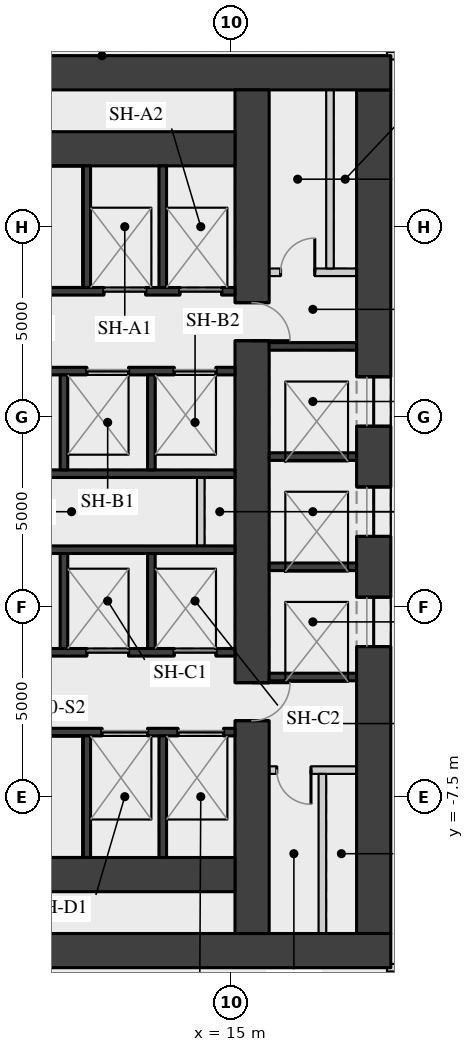
"""IFC4 building model, lengths in metres.
Left out: names, types, materials, properties, quantities, classifications, styles, units other than length and angle.
Written with IfcOpenShell. Run it as: python <this file> out.ifc"""

import sys

from ifc_helpers import new_model, si_unit, direction, frame, frame_2d, origin, place, context, subcontext, project, spatial, rectangle, extrude, element, fill, save


model = new_model("IFC4")
c1 = context("Model", 3, precision=1e-05, world=origin(), true_north=direction((0.0, 1.0)))
c2 = subcontext(c1, "Body", "Model", "MODEL_VIEW")
j1 = project(units=[si_unit("LENGTHUNIT", "METRE"), si_unit("PLANEANGLEUNIT", "RADIAN")], contexts=[c1])
p1 = place(None, origin())
s1 = spatial("IfcSite", under=j1, at=p1, CompositionType="ELEMENT")
p2 = place(p1, origin())
s2 = spatial("IfcBuilding", under=s1, at=p2, CompositionType="ELEMENT")
p3 = place(p2, origin())
s3 = spatial("IfcBuildingStorey", under=s2, at=p3, CompositionType="ELEMENT", Elevation=0.0)
p4 = place(p3, frame((18.75, -11.1, 0.0), z_axis=(0.0, 0.0, 1.0), x_axis=(0.0, 1.0, 0.0)))
e1 = element("IfcWall", 1, at=p4, inside=s3, PredefinedType="SHEAR", context=c2, shape_type="SweptSolid", body=[
    extrude(rectangle(XDim=22.2, YDim=0.9, at=frame_2d((11.1, 0.0))), origin(), (0.0, 0.0, 1.0), 7.09),
])
p5 = place(p4, frame((7.55, 0.0, 0.0)))
e2 = element("IfcOpeningElement", 2, at=p5, cuts=e1, PredefinedType="OPENING", context=c2, shape_type="SweptSolid", body=[
    extrude(rectangle(XDim=1.3, YDim=2.1, at=frame_2d((0.65, 1.05))), frame((0.0, 0.46, 0.0), z_axis=(0.0, -1.0, 0.0), x_axis=(1.0, 0.0, 0.0)), (0.0, 0.0, 1.0), 0.92),
])
p6 = place(p4, frame((10.45, 0.0, 0.0)))
e3 = element("IfcOpeningElement", 3, at=p6, cuts=e1, PredefinedType="OPENING", context=c2, shape_type="SweptSolid", body=[
    extrude(rectangle(XDim=1.3, YDim=2.1, at=frame_2d((0.65, 1.05))), frame((0.0, 0.46, 0.0), z_axis=(0.0, -1.0, 0.0), x_axis=(1.0, 0.0, 0.0)), (0.0, 0.0, 1.0), 0.92),
])
p7 = place(p4, frame((13.35, 0.0, 0.0)))
e4 = element("IfcOpeningElement", 4, at=p7, cuts=e1, PredefinedType="OPENING", context=c2, shape_type="SweptSolid", body=[
    extrude(rectangle(XDim=1.3, YDim=2.1, at=frame_2d((0.65, 1.05))), frame((0.0, 0.46, 0.0), z_axis=(0.0, -1.0, 0.0), x_axis=(1.0, 0.0, 0.0)), (0.0, 0.0, 1.0), 0.92),
])
for number, where, z_axis, x_axis in (
    (5, (4.0, 11.55, 0.0), (0.0, 0.0, 1.0), (1.0, 0.0, 0.0)),
    (6, (4.0, -11.55, 0.0), (0.0, 0.0, 1.0), (1.0, 0.0, 0.0)),
):
    element("IfcWall", number, at=place(p3, frame(where, z_axis=z_axis, x_axis=x_axis)), inside=s3, PredefinedType="SHEAR", context=c2, shape_type="SweptSolid", body=[
        extrude(rectangle(XDim=15.2, YDim=0.9, at=frame_2d((7.6, 0.0))), origin(), (0.0, 0.0, 1.0), 7.09),
    ])
p8 = place(p3, frame((15.55, -11.1, 0.0), z_axis=(0.0, 0.0, 1.0), x_axis=(0.0, 1.0, 0.0)))
e7 = element("IfcWall", 7, at=p8, inside=s3, PredefinedType="SHEAR", context=c2, shape_type="SweptSolid", body=[
    extrude(rectangle(XDim=22.2, YDim=0.9, at=frame_2d((11.1, 0.0))), origin(), (0.0, 0.0, 1.0), 7.09),
])
p9 = place(p8, frame((15.6, 0.0, 0.0)))
e8 = element("IfcOpeningElement", 8, at=p9, cuts=e7, PredefinedType="OPENING", context=c2, shape_type="SweptSolid", body=[
    extrude(rectangle(XDim=1.0, YDim=2.1, at=frame_2d((0.5, 1.05))), frame((0.0, 0.46, 0.0), z_axis=(0.0, -1.0, 0.0), x_axis=(1.0, 0.0, 0.0)), (0.0, 0.0, 1.0), 0.92),
])
p10 = place(p8, frame((5.6, 0.0, 0.0)))
e9 = element("IfcOpeningElement", 9, at=p10, cuts=e7, PredefinedType="OPENING", context=c2, shape_type="SweptSolid", body=[
    extrude(rectangle(XDim=1.0, YDim=2.1, at=frame_2d((0.5, 1.05))), frame((0.0, 0.46, 0.0), z_axis=(0.0, -1.0, 0.0), x_axis=(1.0, 0.0, 0.0)), (0.0, 0.0, 1.0), 0.92),
])
for number, where, z_axis, x_axis in (
    (10, (4.9, 9.55, 0.0), (0.0, 0.0, 1.0), (1.0, 0.0, 0.0)),
    (11, (4.9, -9.55, 0.0), (0.0, 0.0, 1.0), (1.0, 0.0, 0.0)),
):
    element("IfcWall", number, at=place(p3, frame(where, z_axis=z_axis, x_axis=x_axis)), inside=s3, PredefinedType="SHEAR", context=c2, shape_type="SweptSolid", body=[
        extrude(rectangle(XDim=10.2, YDim=0.9, at=frame_2d((5.1, 0.0))), origin(), (0.0, 0.0, 1.0), 7.09),
    ])
p11 = place(p3, frame((4.9, 5.8, 0.0), z_axis=(0.0, 0.0, 1.0), x_axis=(1.0, 0.0, 0.0)))
e12 = element("IfcWall", 12, at=p11, inside=s3, PredefinedType="SHEAR", context=c2, shape_type="SweptSolid", body=[
    extrude(rectangle(XDim=10.2, YDim=0.2, at=frame_2d((5.1, 0.0))), origin(), (0.0, 0.0, 1.0), 7.09),
])
p12 = place(p11, frame((6.75, 0.0, 0.0)))
e13 = element("IfcOpeningElement", 13, at=p12, cuts=e12, PredefinedType="OPENING", context=c2, shape_type="SweptSolid", body=[
    extrude(rectangle(XDim=1.1, YDim=2.1, at=frame_2d((0.55, 1.05))), frame((0.0, 0.11, 0.0), z_axis=(0.0, -1.0, 0.0), x_axis=(1.0, 0.0, 0.0)), (0.0, 0.0, 1.0), 0.22),
])
p13 = place(p11, frame((8.75, 0.0, 0.0)))
e14 = element("IfcOpeningElement", 14, at=p13, cuts=e12, PredefinedType="OPENING", context=c2, shape_type="SweptSolid", body=[
    extrude(rectangle(XDim=1.1, YDim=2.1, at=frame_2d((0.55, 1.05))), frame((0.0, 0.11, 0.0), z_axis=(0.0, -1.0, 0.0), x_axis=(1.0, 0.0, 0.0)), (0.0, 0.0, 1.0), 0.22),
])
p14 = place(p3, frame((4.9, 3.7, 0.0), z_axis=(0.0, 0.0, 1.0), x_axis=(1.0, 0.0, 0.0)))
e15 = element("IfcWall", 15, at=p14, inside=s3, PredefinedType="SHEAR", context=c2, shape_type="SweptSolid", body=[
    extrude(rectangle(XDim=10.2, YDim=0.2, at=frame_2d((5.1, 0.0))), origin(), (0.0, 0.0, 1.0), 7.09),
])
p15 = place(p14, frame((6.3, 0.0, 0.0)))
e16 = element("IfcOpeningElement", 16, at=p15, cuts=e15, PredefinedType="OPENING", context=c2, shape_type="SweptSolid", body=[
    extrude(rectangle(XDim=1.1, YDim=2.1, at=frame_2d((0.55, 1.05))), frame((0.0, 0.11, 0.0), z_axis=(0.0, -1.0, 0.0), x_axis=(1.0, 0.0, 0.0)), (0.0, 0.0, 1.0), 0.22),
])
p16 = place(p14, frame((8.6, 0.0, 0.0)))
e17 = element("IfcOpeningElement", 17, at=p16, cuts=e15, PredefinedType="OPENING", context=c2, shape_type="SweptSolid", body=[
    extrude(rectangle(XDim=1.1, YDim=2.1, at=frame_2d((0.55, 1.05))), frame((0.0, 0.11, 0.0), z_axis=(0.0, -1.0, 0.0), x_axis=(1.0, 0.0, 0.0)), (0.0, 0.0, 1.0), 0.22),
])
for number, where, z_axis, x_axis in (
    (18, (4.9, 1.0, 0.0), (0.0, 0.0, 1.0), (1.0, 0.0, 0.0)),
    (19, (4.9, -1.0, 0.0), (0.0, 0.0, 1.0), (1.0, 0.0, 0.0)),
):
    element("IfcWall", number, at=place(p3, frame(where, z_axis=z_axis, x_axis=x_axis)), inside=s3, PredefinedType="SHEAR", context=c2, shape_type="SweptSolid", body=[
        extrude(rectangle(XDim=10.2, YDim=0.2, at=frame_2d((5.1, 0.0))), origin(), (0.0, 0.0, 1.0), 7.09),
    ])
p17 = place(p3, frame((4.9, -3.7, 0.0), z_axis=(0.0, 0.0, 1.0), x_axis=(1.0, 0.0, 0.0)))
e20 = element("IfcWall", 20, at=p17, inside=s3, PredefinedType="SHEAR", context=c2, shape_type="SweptSolid", body=[
    extrude(rectangle(XDim=10.2, YDim=0.2, at=frame_2d((5.1, 0.0))), origin(), (0.0, 0.0, 1.0), 7.09),
])
p18 = place(p17, frame((6.3, 0.0, 0.0)))
e21 = element("IfcOpeningElement", 21, at=p18, cuts=e20, PredefinedType="OPENING", context=c2, shape_type="SweptSolid", body=[
    extrude(rectangle(XDim=1.1, YDim=2.1, at=frame_2d((0.55, 1.05))), frame((0.0, 0.11, 0.0), z_axis=(0.0, -1.0, 0.0), x_axis=(1.0, 0.0, 0.0)), (0.0, 0.0, 1.0), 0.22),
])
p19 = place(p17, frame((8.6, 0.0, 0.0)))
e22 = element("IfcOpeningElement", 22, at=p19, cuts=e20, PredefinedType="OPENING", context=c2, shape_type="SweptSolid", body=[
    extrude(rectangle(XDim=1.1, YDim=2.1, at=frame_2d((0.55, 1.05))), frame((0.0, 0.11, 0.0), z_axis=(0.0, -1.0, 0.0), x_axis=(1.0, 0.0, 0.0)), (0.0, 0.0, 1.0), 0.22),
])
p20 = place(p3, frame((4.9, -5.8, 0.0), z_axis=(0.0, 0.0, 1.0), x_axis=(1.0, 0.0, 0.0)))
e23 = element("IfcWall", 23, at=p20, inside=s3, PredefinedType="SHEAR", context=c2, shape_type="SweptSolid", body=[
    extrude(rectangle(XDim=10.2, YDim=0.2, at=frame_2d((5.1, 0.0))), origin(), (0.0, 0.0, 1.0), 7.09),
])
p21 = place(p20, frame((6.7, 0.0, 0.0)))
e24 = element("IfcOpeningElement", 24, at=p21, cuts=e23, PredefinedType="OPENING", context=c2, shape_type="SweptSolid", body=[
    extrude(rectangle(XDim=1.2, YDim=2.1, at=frame_2d((0.6, 1.05))), frame((0.0, 0.11, 0.0), z_axis=(0.0, -1.0, 0.0), x_axis=(1.0, 0.0, 0.0)), (0.0, 0.0, 1.0), 0.22),
])
p22 = place(p20, frame((8.7, 0.0, 0.0)))
e25 = element("IfcOpeningElement", 25, at=p22, cuts=e23, PredefinedType="OPENING", context=c2, shape_type="SweptSolid", body=[
    extrude(rectangle(XDim=1.2, YDim=2.1, at=frame_2d((0.6, 1.05))), frame((0.0, 0.11, 0.0), z_axis=(0.0, -1.0, 0.0), x_axis=(1.0, 0.0, 0.0)), (0.0, 0.0, 1.0), 0.22),
])
for number, where, z_axis, x_axis in (
    (26, (11.2, 5.9, 0.0), (0.0, 0.0, 1.0), (0.0, 1.0, 0.0)),
    (27, (11.2, -9.1, 0.0), (0.0, 0.0, 1.0), (0.0, 1.0, 0.0)),
    (28, (13.2, 5.9, 0.0), (0.0, 0.0, 1.0), (0.0, 1.0, 0.0)),
    (29, (13.2, -9.1, 0.0), (0.0, 0.0, 1.0), (0.0, 1.0, 0.0)),
):
    element("IfcWall", number, at=place(p3, frame(where, z_axis=z_axis, x_axis=x_axis)), inside=s3, PredefinedType="SHEAR", context=c2, shape_type="SweptSolid", body=[
        extrude(rectangle(XDim=3.2, YDim=0.2, at=frame_2d((1.6, 0.0))), origin(), (0.0, 0.0, 1.0), 7.09),
    ])
for number, where, z_axis, x_axis in (
    (30, (10.6, 1.1, 0.0), (0.0, 0.0, 1.0), (0.0, 1.0, 0.0)),
    (31, (10.6, -3.6, 0.0), (0.0, 0.0, 1.0), (0.0, 1.0, 0.0)),
    (32, (12.9, 1.1, 0.0), (0.0, 0.0, 1.0), (0.0, 1.0, 0.0)),
    (33, (12.9, -3.6, 0.0), (0.0, 0.0, 1.0), (0.0, 1.0, 0.0)),
):
    element("IfcWall", number, at=place(p3, frame(where, z_axis=z_axis, x_axis=x_axis)), inside=s3, PredefinedType="SHEAR", context=c2, shape_type="SweptSolid", body=[
        extrude(rectangle(XDim=2.5, YDim=0.2, at=frame_2d((1.25, 0.0))), origin(), (0.0, 0.0, 1.0), 7.09),
    ])
p23 = place(p3, frame((14.2, -0.9, 0.0), z_axis=(0.0, 0.0, 1.0), x_axis=(0.0, 1.0, 0.0)))
e34 = element("IfcWall", 34, at=p23, inside=s3, PredefinedType="PARTITIONING", context=c2, shape_type="SweptSolid", body=[
    extrude(rectangle(XDim=1.8, YDim=0.2, at=frame_2d((0.9, 0.0))), origin(), (0.0, 0.0, 1.0), 7.09),
])
for number, where, z_axis, x_axis in (
    (35, (16.0, -4.35, 0.0), (0.0, 0.0, 1.0), (1.0, 0.0, 0.0)),
    (36, (16.0, -1.45, 0.0), (0.0, 0.0, 1.0), (1.0, 0.0, 0.0)),
    (37, (16.0, 1.45, 0.0), (0.0, 0.0, 1.0), (1.0, 0.0, 0.0)),
    (38, (16.0, 4.35, 0.0), (0.0, 0.0, 1.0), (1.0, 0.0, 0.0)),
):
    element("IfcWall", number, at=place(p3, frame(where, z_axis=z_axis, x_axis=x_axis)), inside=s3, PredefinedType="SHEAR", context=c2, shape_type="SweptSolid", body=[
        extrude(rectangle(XDim=2.3, YDim=0.2, at=frame_2d((1.15, 0.0))), origin(), (0.0, 0.0, 1.0), 7.09),
    ])
p24 = place(p3, frame((16.0, 6.3, 0.0), z_axis=(0.0, 0.0, 1.0), x_axis=(1.0, 0.0, 0.0)))
e39 = element("IfcWall", 39, at=p24, inside=s3, PredefinedType="PARTITIONING", context=c2, shape_type="SweptSolid", body=[
    extrude(rectangle(XDim=2.3, YDim=0.2, at=frame_2d((1.15, 0.0))), origin(), (0.0, 0.0, 1.0), 7.09),
])
p25 = place(p24, frame((0.3, 0.0, 0.0)))
e40 = element("IfcOpeningElement", 40, at=p25, cuts=e39, PredefinedType="OPENING", context=c2, shape_type="SweptSolid", body=[
    extrude(rectangle(XDim=0.9, YDim=2.1, at=frame_2d((0.45, 1.05))), frame((0.0, 0.11, 0.0), z_axis=(0.0, -1.0, 0.0), x_axis=(1.0, 0.0, 0.0)), (0.0, 0.0, 1.0), 0.22),
])
p26 = place(p3, frame((17.6, 6.4, 0.0), z_axis=(0.0, 0.0, 1.0), x_axis=(0.0, 1.0, 0.0)))
e41 = element("IfcWall", 41, at=p26, inside=s3, PredefinedType="PARTITIONING", context=c2, shape_type="SweptSolid", body=[
    extrude(rectangle(XDim=4.7, YDim=0.2, at=frame_2d((2.35, 0.0))), origin(), (0.0, 0.0, 1.0), 7.09),
])
p27 = place(p3, frame((16.0, -6.8, 0.0), z_axis=(0.0, 0.0, 1.0), x_axis=(1.0, 0.0, 0.0)))
e42 = element("IfcWall", 42, at=p27, inside=s3, PredefinedType="PARTITIONING", context=c2, shape_type="SweptSolid", body=[
    extrude(rectangle(XDim=2.3, YDim=0.2, at=frame_2d((1.15, 0.0))), origin(), (0.0, 0.0, 1.0), 7.09),
])
p28 = place(p27, frame((0.2, 0.0, 0.0)))
e43 = element("IfcOpeningElement", 43, at=p28, cuts=e42, PredefinedType="OPENING", context=c2, shape_type="SweptSolid", body=[
    extrude(rectangle(XDim=0.9, YDim=2.1, at=frame_2d((0.45, 1.05))), frame((0.0, 0.11, 0.0), z_axis=(0.0, -1.0, 0.0), x_axis=(1.0, 0.0, 0.0)), (0.0, 0.0, 1.0), 0.22),
])
p29 = place(p3, frame((17.4, -11.1, 0.0), z_axis=(0.0, 0.0, 1.0), x_axis=(0.0, 1.0, 0.0)))
e44 = element("IfcWall", 44, at=p29, inside=s3, PredefinedType="PARTITIONING", context=c2, shape_type="SweptSolid", body=[
    extrude(rectangle(XDim=4.2, YDim=0.2, at=frame_2d((2.1, 0.0))), origin(), (0.0, 0.0, 1.0), 7.09),
])
p30 = place(p3, frame((19.1, -12.0, 0.0), z_axis=(0.0, 0.0, 1.0), x_axis=(1.0, 0.0, 0.0)))
e45 = element("IfcWall", 45, at=p30, inside=s3, PredefinedType="PARTITIONING", context=c2, shape_type="SweptSolid", body=[
    extrude(rectangle(XDim=8.8, YDim=0.2, at=frame_2d((4.4, 0.0))), origin(), (0.0, 0.0, 1.0), 7.09),
])
p31 = place(p30, frame((4.4, 0.0, 0.0)))
e46 = element("IfcOpeningElement", 46, at=p31, cuts=e45, PredefinedType="OPENING", context=c2, shape_type="SweptSolid", body=[
    extrude(rectangle(XDim=1.0, YDim=2.1, at=frame_2d((0.5, 1.05))), frame((0.0, 0.11, 0.0), z_axis=(0.0, -1.0, 0.0), x_axis=(1.0, 0.0, 0.0)), (0.0, 0.0, 1.0), 0.22),
])
p32 = place(p3, frame((19.1, 12.0, 0.0), z_axis=(0.0, 0.0, 1.0), x_axis=(1.0, 0.0, 0.0)))
e47 = element("IfcWall", 47, at=p32, inside=s3, PredefinedType="PARTITIONING", context=c2, shape_type="SweptSolid", body=[
    extrude(rectangle(XDim=21.767, YDim=0.2, at=frame_2d((10.883, 0.0))), origin(), (0.0, 0.0, 1.0), 6.09),
])
p33 = place(p32, frame((4.4, 0.0, 0.0)))
e48 = element("IfcOpeningElement", 48, at=p33, cuts=e47, PredefinedType="OPENING", context=c2, shape_type="SweptSolid", body=[
    extrude(rectangle(XDim=1.0, YDim=2.1, at=frame_2d((0.5, 1.05))), frame((0.0, 0.11, 0.0), z_axis=(0.0, -1.0, 0.0), x_axis=(1.0, 0.0, 0.0)), (0.0, 0.0, 1.0), 0.22),
])
p34 = place(p12, origin())
e49 = element("IfcDoor", 49, at=p34, inside=s3, OperationType="DOUBLE_DOOR_SLIDING", PredefinedType="DOOR", context=c2, shape_type="SweptSolid", body=[
    extrude(rectangle(XDim=1.1, YDim=2.1, at=frame_2d((0.55, 1.05))), frame((0.0, 0.025, 0.0), z_axis=(0.0, -1.0, 0.0), x_axis=(1.0, 0.0, 0.0)), (0.0, 0.0, 1.0), 0.05),
])
fill(e13, e49)
p35 = place(p13, origin())
e50 = element("IfcDoor", 50, at=p35, inside=s3, OperationType="DOUBLE_DOOR_SLIDING", PredefinedType="DOOR", context=c2, shape_type="SweptSolid", body=[
    extrude(rectangle(XDim=1.1, YDim=2.1, at=frame_2d((0.55, 1.05))), frame((0.0, 0.025, 0.0), z_axis=(0.0, -1.0, 0.0), x_axis=(1.0, 0.0, 0.0)), (0.0, 0.0, 1.0), 0.05),
])
fill(e14, e50)
p36 = place(p15, origin())
e51 = element("IfcDoor", 51, at=p36, inside=s3, OperationType="DOUBLE_DOOR_SLIDING", PredefinedType="DOOR", context=c2, shape_type="SweptSolid", body=[
    extrude(rectangle(XDim=1.1, YDim=2.1, at=frame_2d((0.55, 1.05))), frame((0.0, 0.025, 0.0), z_axis=(0.0, -1.0, 0.0), x_axis=(1.0, 0.0, 0.0)), (0.0, 0.0, 1.0), 0.05),
])
fill(e16, e51)
p37 = place(p16, origin())
e52 = element("IfcDoor", 52, at=p37, inside=s3, OperationType="DOUBLE_DOOR_SLIDING", PredefinedType="DOOR", context=c2, shape_type="SweptSolid", body=[
    extrude(rectangle(XDim=1.1, YDim=2.1, at=frame_2d((0.55, 1.05))), frame((0.0, 0.025, 0.0), z_axis=(0.0, -1.0, 0.0), x_axis=(1.0, 0.0, 0.0)), (0.0, 0.0, 1.0), 0.05),
])
fill(e17, e52)
p38 = place(p18, origin())
e53 = element("IfcDoor", 53, at=p38, inside=s3, OperationType="DOUBLE_DOOR_SLIDING", PredefinedType="DOOR", context=c2, shape_type="SweptSolid", body=[
    extrude(rectangle(XDim=1.1, YDim=2.1, at=frame_2d((0.55, 1.05))), frame((0.0, 0.025, 0.0), z_axis=(0.0, -1.0, 0.0), x_axis=(1.0, 0.0, 0.0)), (0.0, 0.0, 1.0), 0.05),
])
fill(e21, e53)
p39 = place(p19, origin())
e54 = element("IfcDoor", 54, at=p39, inside=s3, OperationType="DOUBLE_DOOR_SLIDING", PredefinedType="DOOR", context=c2, shape_type="SweptSolid", body=[
    extrude(rectangle(XDim=1.1, YDim=2.1, at=frame_2d((0.55, 1.05))), frame((0.0, 0.025, 0.0), z_axis=(0.0, -1.0, 0.0), x_axis=(1.0, 0.0, 0.0)), (0.0, 0.0, 1.0), 0.05),
])
fill(e22, e54)
p40 = place(p21, origin())
e55 = element("IfcDoor", 55, at=p40, inside=s3, OperationType="DOUBLE_DOOR_SLIDING", PredefinedType="DOOR", context=c2, shape_type="SweptSolid", body=[
    extrude(rectangle(XDim=1.2, YDim=2.1, at=frame_2d((0.6, 1.05))), frame((0.0, 0.025, 0.0), z_axis=(0.0, -1.0, 0.0), x_axis=(1.0, 0.0, 0.0)), (0.0, 0.0, 1.0), 0.05),
])
fill(e24, e55)
p41 = place(p22, origin())
e56 = element("IfcDoor", 56, at=p41, inside=s3, OperationType="DOUBLE_DOOR_SLIDING", PredefinedType="DOOR", context=c2, shape_type="SweptSolid", body=[
    extrude(rectangle(XDim=1.2, YDim=2.1, at=frame_2d((0.6, 1.05))), frame((0.0, 0.025, 0.0), z_axis=(0.0, -1.0, 0.0), x_axis=(1.0, 0.0, 0.0)), (0.0, 0.0, 1.0), 0.05),
])
fill(e25, e56)
p42 = place(p5, origin())
e57 = element("IfcDoor", 57, at=p42, inside=s3, OperationType="DOUBLE_DOOR_SLIDING", PredefinedType="DOOR", context=c2, shape_type="SweptSolid", body=[
    extrude(rectangle(XDim=1.3, YDim=2.1, at=frame_2d((0.65, 1.05))), frame((0.0, 0.025, 0.0), z_axis=(0.0, -1.0, 0.0), x_axis=(1.0, 0.0, 0.0)), (0.0, 0.0, 1.0), 0.05),
])
fill(e2, e57)
p43 = place(p6, origin())
e58 = element("IfcDoor", 58, at=p43, inside=s3, OperationType="DOUBLE_DOOR_SLIDING", PredefinedType="DOOR", context=c2, shape_type="SweptSolid", body=[
    extrude(rectangle(XDim=1.3, YDim=2.1, at=frame_2d((0.65, 1.05))), frame((0.0, 0.025, 0.0), z_axis=(0.0, -1.0, 0.0), x_axis=(1.0, 0.0, 0.0)), (0.0, 0.0, 1.0), 0.05),
])
fill(e3, e58)
p44 = place(p7, origin())
e59 = element("IfcDoor", 59, at=p44, inside=s3, OperationType="DOUBLE_DOOR_SLIDING", PredefinedType="DOOR", context=c2, shape_type="SweptSolid", body=[
    extrude(rectangle(XDim=1.3, YDim=2.1, at=frame_2d((0.65, 1.05))), frame((0.0, 0.025, 0.0), z_axis=(0.0, -1.0, 0.0), x_axis=(1.0, 0.0, 0.0)), (0.0, 0.0, 1.0), 0.05),
])
fill(e4, e59)
p45 = place(p9, origin())
e60 = element("IfcDoor", 60, at=p45, inside=s3, OperationType="SINGLE_SWING_RIGHT", PredefinedType="DOOR", context=c2, shape_type="SweptSolid", body=[
    extrude(rectangle(XDim=1.0, YDim=2.1, at=frame_2d((0.5, 1.05))), frame((0.0, 0.025, 0.0), z_axis=(0.0, -1.0, 0.0), x_axis=(1.0, 0.0, 0.0)), (0.0, 0.0, 1.0), 0.05),
])
fill(e8, e60)
p46 = place(p25, origin())
e61 = element("IfcDoor", 61, at=p46, inside=s3, OperationType="SINGLE_SWING_RIGHT", PredefinedType="DOOR", context=c2, shape_type="SweptSolid", body=[
    extrude(rectangle(XDim=0.9, YDim=2.1, at=frame_2d((0.45, 1.05))), frame((0.0, 0.025, 0.0), z_axis=(0.0, -1.0, 0.0), x_axis=(1.0, 0.0, 0.0)), (0.0, 0.0, 1.0), 0.05),
])
fill(e40, e61)
p47 = place(p10, origin())
e62 = element("IfcDoor", 62, at=p47, inside=s3, OperationType="SINGLE_SWING_LEFT", PredefinedType="DOOR", context=c2, shape_type="SweptSolid", body=[
    extrude(rectangle(XDim=1.0, YDim=2.1, at=frame_2d((0.5, 1.05))), frame((0.0, 0.025, 0.0), z_axis=(0.0, -1.0, 0.0), x_axis=(1.0, 0.0, 0.0)), (0.0, 0.0, 1.0), 0.05),
])
fill(e9, e62)
p48 = place(p28, origin())
e63 = element("IfcDoor", 63, at=p48, inside=s3, OperationType="SINGLE_SWING_LEFT", PredefinedType="DOOR", context=c2, shape_type="SweptSolid", body=[
    extrude(rectangle(XDim=0.9, YDim=2.1, at=frame_2d((0.45, 1.05))), frame((0.0, 0.025, 0.0), z_axis=(0.0, -1.0, 0.0), x_axis=(1.0, 0.0, 0.0)), (0.0, 0.0, 1.0), 0.05),
])
fill(e43, e63)
save(model, sys.argv[1])
